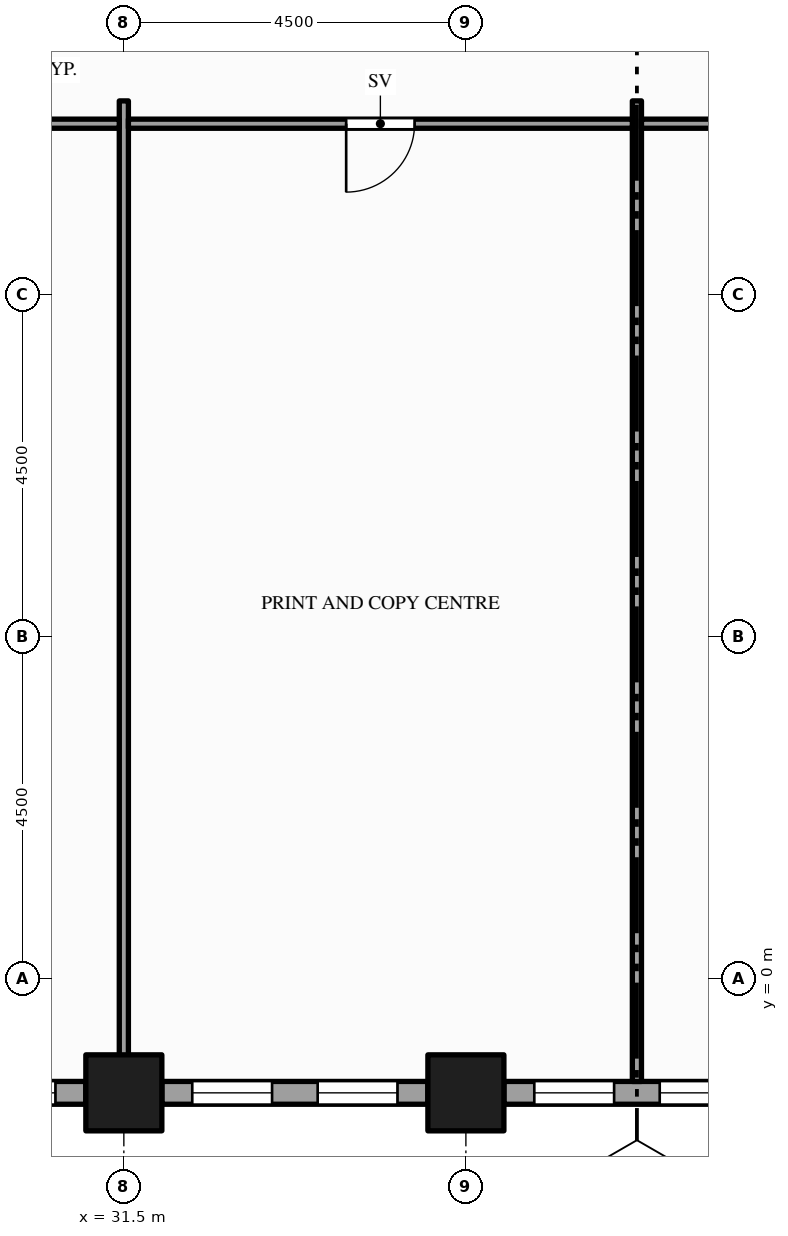
"""IFC4 building model, lengths in metres.
Left out: names, types, materials, properties, quantities, classifications, styles, units other than length and angle.
Written with IfcOpenShell. Run it as: python <this file> out.ifc"""

import sys

from ifc_helpers import new_model, si_unit, direction, frame, frame_2d, origin, origin_2d, place, context, subcontext, project, spatial, rectangle, hollow_rectangle, extrude, element, fill, save


model = new_model("IFC4")
c1 = context("Model", 3, precision=1e-05, world=origin(), true_north=direction((0.0, 1.0)))
c2 = subcontext(c1, "Body", "Model", "MODEL_VIEW")
j1 = project(units=[si_unit("LENGTHUNIT", "METRE"), si_unit("PLANEANGLEUNIT", "RADIAN")], contexts=[c1])
p1 = place(None, origin())
s1 = spatial("IfcSite", under=j1, at=p1, CompositionType="ELEMENT")
p2 = place(p1, origin())
s2 = spatial("IfcBuilding", under=s1, at=p2, CompositionType="ELEMENT")
p3 = place(p2, frame((0.0, 0.0, 127.0)))
s3 = spatial("IfcBuildingStorey", under=s2, at=p3, CompositionType="ELEMENT", Elevation=127.0)
for number, where, z_axis, x_axis in (
    (1, (31.5, -1.5, -0.15), (0.0, 0.0, 1.0), (1.0, 0.0, 0.0)),
    (2, (36.0, -1.5, -0.15), (0.0, 0.0, 1.0), (1.0, 0.0, 0.0)),
):
    element("IfcColumn", number, at=place(p3, frame(where, z_axis=z_axis, x_axis=x_axis)), inside=s3, PredefinedType="COLUMN", context=c2, shape_type="SweptSolid", body=[
        extrude(hollow_rectangle(XDim=1.0, YDim=1.0, WallThickness=0.05, at=origin_2d()), origin(), (0.0, 0.0, 1.0), 3.9),
    ])
p4 = place(p3, frame((27.5, -1.5, 0.0), z_axis=(0.0, 0.0, 1.0), x_axis=(1.0, 0.0, 0.0)))
e3 = element("IfcWall", 3, at=p4, inside=s3, PredefinedType="STANDARD", context=c2, shape_type="SweptSolid", body=[
    extrude(rectangle(XDim=3.5, YDim=0.3, at=frame_2d((1.75, 0.0))), origin(), (0.0, 0.0, 1.0), 3.054),
])
p5 = place(p4, frame((0.4, 0.0, 0.9)))
e4 = element("IfcOpeningElement", 4, at=p5, cuts=e3, PredefinedType="OPENING", context=c2, shape_type="SweptSolid", body=[
    extrude(rectangle(XDim=1.05, YDim=2.0, at=frame_2d((0.525, 1.0))), frame((0.0, 0.16, 0.0), z_axis=(0.0, -1.0, 0.0), x_axis=(1.0, 0.0, 0.0)), (0.0, 0.0, 1.0), 0.32),
])
p6 = place(p4, frame((2.05, 0.0, 0.9)))
e5 = element("IfcOpeningElement", 5, at=p6, cuts=e3, PredefinedType="OPENING", context=c2, shape_type="SweptSolid", body=[
    extrude(rectangle(XDim=1.05, YDim=2.0, at=frame_2d((0.525, 1.0))), frame((0.0, 0.16, 0.0), z_axis=(0.0, -1.0, 0.0), x_axis=(1.0, 0.0, 0.0)), (0.0, 0.0, 1.0), 0.32),
])
p7 = place(p3, frame((32.0, -1.5, 0.0), z_axis=(0.0, 0.0, 1.0), x_axis=(1.0, 0.0, 0.0)))
e6 = element("IfcWall", 6, at=p7, inside=s3, PredefinedType="STANDARD", context=c2, shape_type="SweptSolid", body=[
    extrude(rectangle(XDim=3.5, YDim=0.3, at=frame_2d((1.75, 0.0))), origin(), (0.0, 0.0, 1.0), 3.054),
])
p8 = place(p7, frame((0.4, 0.0, 0.9)))
e7 = element("IfcOpeningElement", 7, at=p8, cuts=e6, PredefinedType="OPENING", context=c2, shape_type="SweptSolid", body=[
    extrude(rectangle(XDim=1.05, YDim=2.0, at=frame_2d((0.525, 1.0))), frame((0.0, 0.16, 0.0), z_axis=(0.0, -1.0, 0.0), x_axis=(1.0, 0.0, 0.0)), (0.0, 0.0, 1.0), 0.32),
])
p9 = place(p7, frame((2.05, 0.0, 0.9)))
e8 = element("IfcOpeningElement", 8, at=p9, cuts=e6, PredefinedType="OPENING", context=c2, shape_type="SweptSolid", body=[
    extrude(rectangle(XDim=1.05, YDim=2.0, at=frame_2d((0.525, 1.0))), frame((0.0, 0.16, 0.0), z_axis=(0.0, -1.0, 0.0), x_axis=(1.0, 0.0, 0.0)), (0.0, 0.0, 1.0), 0.32),
])
p10 = place(p3, frame((36.5, -1.5, 0.0), z_axis=(0.0, 0.0, 1.0), x_axis=(1.0, 0.0, 0.0)))
e9 = element("IfcWall", 9, at=p10, inside=s3, PredefinedType="STANDARD", context=c2, shape_type="SweptSolid", body=[
    extrude(rectangle(XDim=3.5, YDim=0.3, at=frame_2d((1.75, 0.0))), origin(), (0.0, 0.0, 1.0), 3.054),
])
p11 = place(p10, frame((0.4, 0.0, 0.9)))
e10 = element("IfcOpeningElement", 10, at=p11, cuts=e9, PredefinedType="OPENING", context=c2, shape_type="SweptSolid", body=[
    extrude(rectangle(XDim=1.05, YDim=2.0, at=frame_2d((0.525, 1.0))), frame((0.0, 0.16, 0.0), z_axis=(0.0, -1.0, 0.0), x_axis=(1.0, 0.0, 0.0)), (0.0, 0.0, 1.0), 0.32),
])
p12 = place(p10, frame((2.05, 0.0, 0.9)))
e11 = element("IfcOpeningElement", 11, at=p12, cuts=e9, PredefinedType="OPENING", context=c2, shape_type="SweptSolid", body=[
    extrude(rectangle(XDim=1.05, YDim=2.0, at=frame_2d((0.525, 1.0))), frame((0.0, 0.16, 0.0), z_axis=(0.0, -1.0, 0.0), x_axis=(1.0, 0.0, 0.0)), (0.0, 0.0, 1.0), 0.32),
])
p13 = place(p3, frame((31.5, -1.35, 0.0), z_axis=(0.0, 0.0, 1.0), x_axis=(0.0, 1.0, 0.0)))
e12 = element("IfcWall", 12, at=p13, inside=s3, PredefinedType="PARTITIONING", context=c2, shape_type="SweptSolid", body=[
    extrude(rectangle(XDim=12.9, YDim=0.12, at=frame_2d((6.45, 0.0))), origin(), (0.0, 0.0, 1.0), 2.35),
])
p14 = place(p3, frame((38.25, -1.35, 0.0), z_axis=(0.0, 0.0, 1.0), x_axis=(0.0, 1.0, 0.0)))
e13 = element("IfcWall", 13, at=p14, inside=s3, PredefinedType="PARTITIONING", context=c2, shape_type="SweptSolid", body=[
    extrude(rectangle(XDim=12.9, YDim=0.12, at=frame_2d((6.45, 0.0))), origin(), (0.0, 0.0, 1.0), 2.838),
])
p15 = place(p3, frame((24.81, 11.25, 0.0), z_axis=(0.0, 0.0, 1.0), x_axis=(1.0, 0.0, 0.0)))
e14 = element("IfcWall", 14, at=p15, inside=s3, PredefinedType="PARTITIONING", context=c2, shape_type="SweptSolid", body=[
    extrude(rectangle(XDim=6.63, YDim=0.12, at=frame_2d((3.315, 0.0))), origin(), (0.0, 0.0, 1.0), 2.838),
])
p16 = place(p15, frame((2.865, 0.0, 0.0)))
e15 = element("IfcOpeningElement", 15, at=p16, cuts=e14, PredefinedType="OPENING", context=c2, shape_type="SweptSolid", body=[
    extrude(rectangle(XDim=0.9, YDim=2.1, at=frame_2d((0.45, 1.05))), frame((0.0, 0.07, 0.0), z_axis=(0.0, -1.0, 0.0), x_axis=(1.0, 0.0, 0.0)), (0.0, 0.0, 1.0), 0.14),
])
p17 = place(p3, frame((31.56, 11.25, 0.0), z_axis=(0.0, 0.0, 1.0), x_axis=(1.0, 0.0, 0.0)))
e16 = element("IfcWall", 16, at=p17, inside=s3, PredefinedType="PARTITIONING", context=c2, shape_type="SweptSolid", body=[
    extrude(rectangle(XDim=6.63, YDim=0.12, at=frame_2d((3.315, 0.0))), origin(), (0.0, 0.0, 1.0), 2.838),
])
p18 = place(p17, frame((2.865, 0.0, 0.0)))
e17 = element("IfcOpeningElement", 17, at=p18, cuts=e16, PredefinedType="OPENING", context=c2, shape_type="SweptSolid", body=[
    extrude(rectangle(XDim=0.9, YDim=2.1, at=frame_2d((0.45, 1.05))), frame((0.0, 0.07, 0.0), z_axis=(0.0, -1.0, 0.0), x_axis=(1.0, 0.0, 0.0)), (0.0, 0.0, 1.0), 0.14),
])
p19 = place(p3, frame((38.31, 11.25, 0.0), z_axis=(0.0, 0.0, 1.0), x_axis=(1.0, 0.0, 0.0)))
e18 = element("IfcWall", 18, at=p19, inside=s3, PredefinedType="PARTITIONING", context=c2, shape_type="SweptSolid", body=[
    extrude(rectangle(XDim=4.38, YDim=0.12, at=frame_2d((2.19, 0.0))), origin(), (0.0, 0.0, 1.0), 2.838),
])
p20 = place(p19, frame((1.69, 0.0, 0.0)))
e19 = element("IfcOpeningElement", 19, at=p20, cuts=e18, PredefinedType="OPENING", context=c2, shape_type="SweptSolid", body=[
    extrude(rectangle(XDim=1.0, YDim=2.1, at=frame_2d((0.5, 1.05))), frame((0.0, 0.07, 0.0), z_axis=(0.0, -1.0, 0.0), x_axis=(1.0, 0.0, 0.0)), (0.0, 0.0, 1.0), 0.14),
])
p21 = place(p6, origin())
e20 = element("IfcWindow", 20, at=p21, inside=s3, PartitioningType="SINGLE_PANEL", PredefinedType="WINDOW", context=c2, shape_type="SweptSolid", body=[
    extrude(rectangle(XDim=1.05, YDim=2.0, at=frame_2d((0.525, 1.0))), frame((0.0, 0.03, 0.0), z_axis=(0.0, -1.0, 0.0), x_axis=(1.0, 0.0, 0.0)), (0.0, 0.0, 1.0), 0.06),
])
fill(e5, e20)
p22 = place(p8, origin())
e21 = element("IfcWindow", 21, at=p22, inside=s3, PartitioningType="SINGLE_PANEL", PredefinedType="WINDOW", context=c2, shape_type="SweptSolid", body=[
    extrude(rectangle(XDim=1.05, YDim=2.0, at=frame_2d((0.525, 1.0))), frame((0.0, 0.03, 0.0), z_axis=(0.0, -1.0, 0.0), x_axis=(1.0, 0.0, 0.0)), (0.0, 0.0, 1.0), 0.06),
])
fill(e7, e21)
p23 = place(p9, origin())
e22 = element("IfcWindow", 22, at=p23, inside=s3, PartitioningType="SINGLE_PANEL", PredefinedType="WINDOW", context=c2, shape_type="SweptSolid", body=[
    extrude(rectangle(XDim=1.05, YDim=2.0, at=frame_2d((0.525, 1.0))), frame((0.0, 0.03, 0.0), z_axis=(0.0, -1.0, 0.0), x_axis=(1.0, 0.0, 0.0)), (0.0, 0.0, 1.0), 0.06),
])
fill(e8, e22)
p24 = place(p11, origin())
e23 = element("IfcWindow", 23, at=p24, inside=s3, PartitioningType="SINGLE_PANEL", PredefinedType="WINDOW", context=c2, shape_type="SweptSolid", body=[
    extrude(rectangle(XDim=1.05, YDim=2.0, at=frame_2d((0.525, 1.0))), frame((0.0, 0.03, 0.0), z_axis=(0.0, -1.0, 0.0), x_axis=(1.0, 0.0, 0.0)), (0.0, 0.0, 1.0), 0.06),
])
fill(e10, e23)
p25 = place(p12, origin())
e24 = element("IfcWindow", 24, at=p25, inside=s3, PartitioningType="SINGLE_PANEL", PredefinedType="WINDOW", context=c2, shape_type="SweptSolid", body=[
    extrude(rectangle(XDim=1.05, YDim=2.0, at=frame_2d((0.525, 1.0))), frame((0.0, 0.03, 0.0), z_axis=(0.0, -1.0, 0.0), x_axis=(1.0, 0.0, 0.0)), (0.0, 0.0, 1.0), 0.06),
])
fill(e11, e24)
p26 = place(p18, origin())
e25 = element("IfcDoor", 25, at=p26, inside=s3, OperationType="SINGLE_SWING_LEFT", PredefinedType="DOOR", context=c2, shape_type="SweptSolid", body=[
    extrude(rectangle(XDim=0.9, YDim=2.1, at=frame_2d((0.45, 1.05))), frame((0.0, 0.025, 0.0), z_axis=(0.0, -1.0, 0.0), x_axis=(1.0, 0.0, 0.0)), (0.0, 0.0, 1.0), 0.05),
])
fill(e17, e25)
save(model, sys.argv[1])
